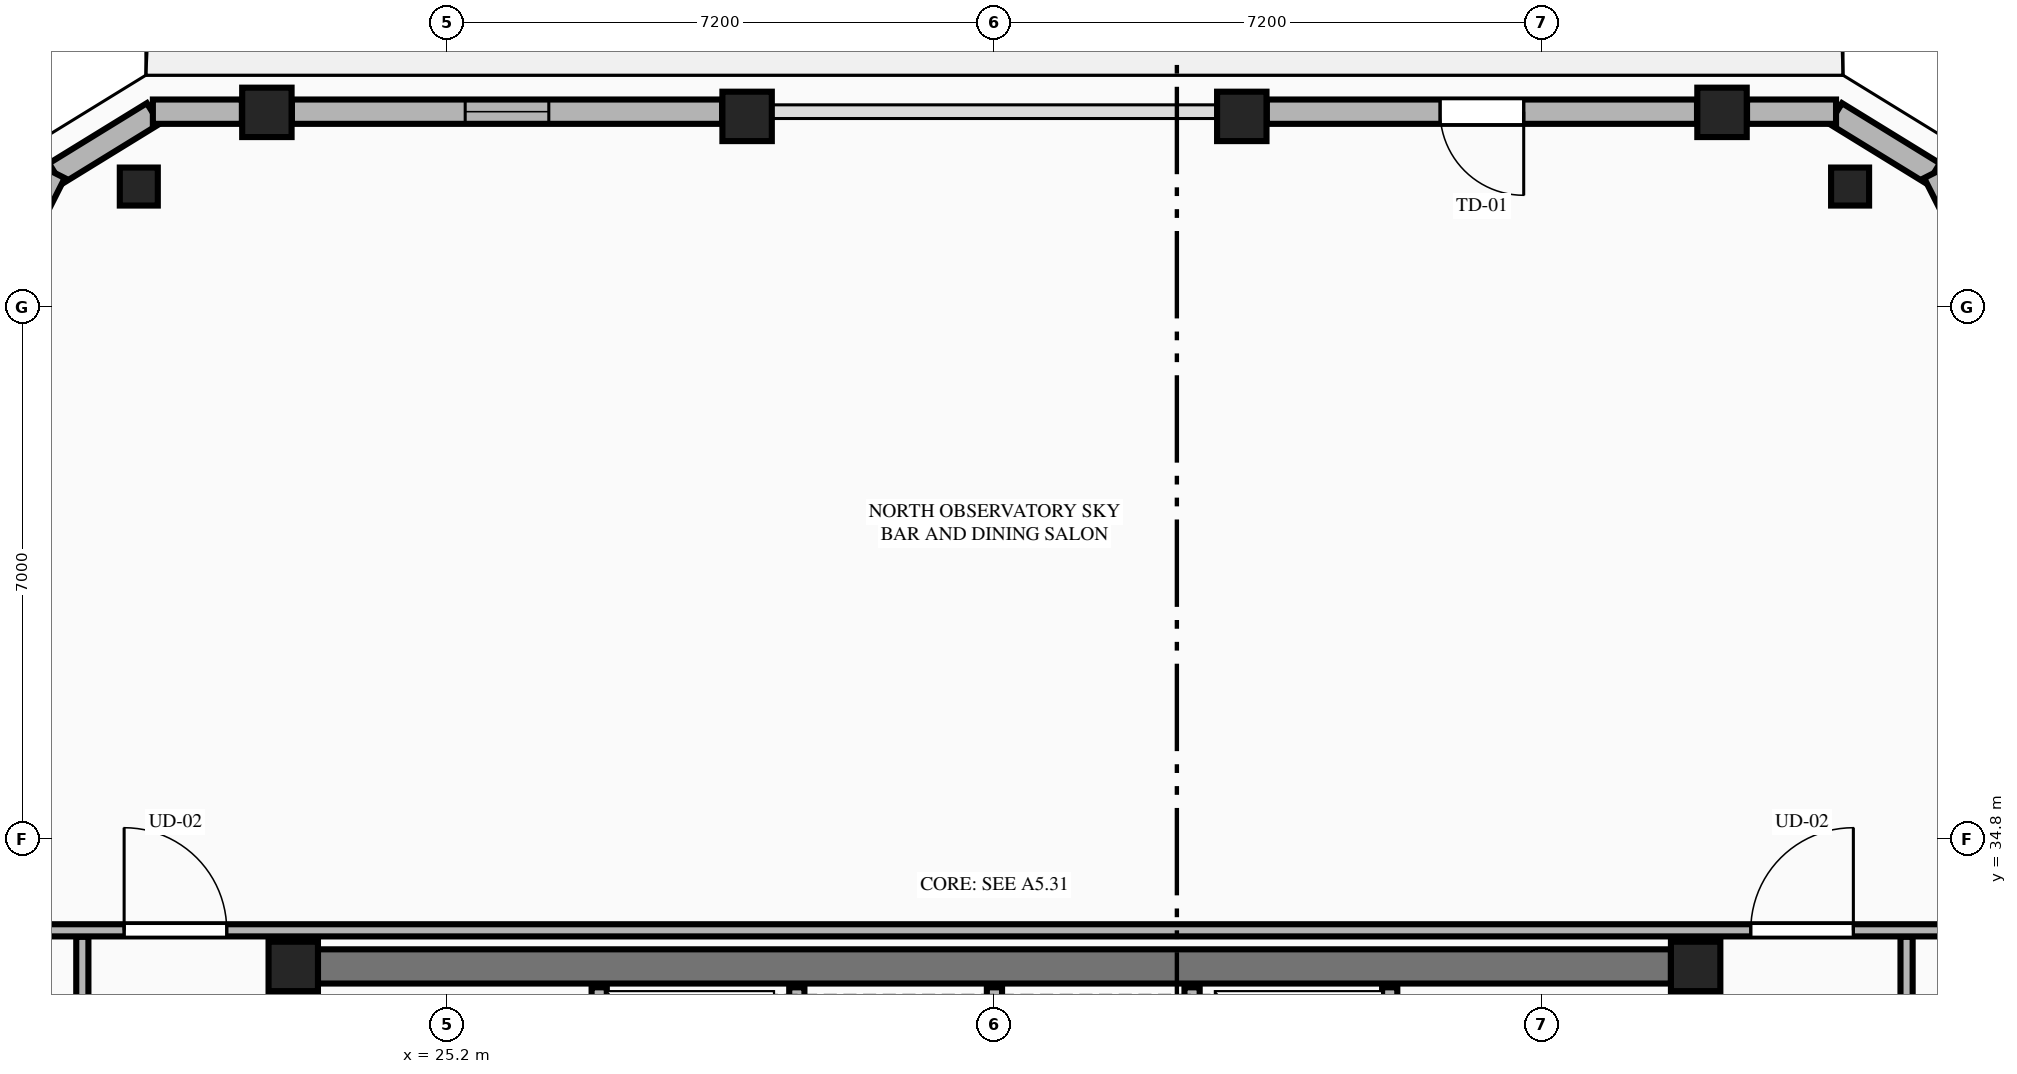
"""IFC4 building model, lengths in metres.
Left out: names, types, materials, properties, quantities, classifications, styles, units other than length and angle.
Written with IfcOpenShell. Run it as: python <this file> out.ifc"""

import sys

from ifc_helpers import new_model, si_unit, direction, frame, frame_2d, origin, origin_2d, place, context, subcontext, project, spatial, rectangle, extrude, element, fill, save


model = new_model("IFC4")
c1 = context("Model", 3, precision=1e-05, world=origin(), true_north=direction((0.0, 1.0)))
c2 = subcontext(c1, "Body", "Model", "MODEL_VIEW")
j1 = project(units=[si_unit("LENGTHUNIT", "METRE"), si_unit("PLANEANGLEUNIT", "RADIAN")], contexts=[c1])
p1 = place(None, origin())
s1 = spatial("IfcSite", under=j1, at=p1, CompositionType="ELEMENT")
p2 = place(p1, origin())
s2 = spatial("IfcBuilding", under=s1, at=p2, CompositionType="ELEMENT")
p3 = place(p2, frame((0.0, 0.0, 278.1)))
s3 = spatial("IfcBuildingStorey", under=s2, at=p3, CompositionType="ELEMENT", Elevation=278.1)
for number, where, z_axis, x_axis in (
    (1, (41.625, 33.125, 0.0), (0.0, 0.0, 1.0), (1.0, 0.0, 0.0)),
    (2, (23.175, 33.125, 0.0), (0.0, 0.0, 1.0), (1.0, 0.0, 0.0)),
):
    element("IfcColumn", number, at=place(p3, frame(where, z_axis=z_axis, x_axis=x_axis)), inside=s3, PredefinedType="COLUMN", context=c2, shape_type="SweptSolid", body=[
        extrude(rectangle(XDim=0.65, YDim=0.65, at=origin_2d()), origin(), (0.0, 0.0, 1.0), 5.4),
    ])
p4 = place(p3, frame((23.5, 33.125, 0.0), z_axis=(0.0, 0.0, 1.0), x_axis=(1.0, 0.0, 0.0)))
e3 = element("IfcWall", 3, at=p4, inside=s3, PredefinedType="SHEAR", context=c2, shape_type="SweptSolid", body=[
    extrude(rectangle(XDim=17.8, YDim=0.45, at=frame_2d((8.9, 0.0))), origin(), (0.0, 0.0, 1.0), 5.2),
])
p5 = place(p3, frame((23.175, 19.0, 0.0), z_axis=(0.0, 0.0, 1.0), x_axis=(0.0, 1.0, 0.0)))
e4 = element("IfcWall", 4, at=p5, inside=s3, PredefinedType="SHEAR", context=c2, shape_type="SweptSolid", body=[
    extrude(rectangle(XDim=13.8, YDim=0.45, at=frame_2d((6.9, 0.0))), origin(), (0.0, 0.0, 1.0), 5.2),
])
p6 = place(p5, frame((2.84, 0.0, 0.0)))
e5 = element("IfcOpeningElement", 5, at=p6, cuts=e4, PredefinedType="OPENING", context=c2, shape_type="SweptSolid", body=[
    extrude(rectangle(XDim=1.22, YDim=2.25, at=frame_2d((0.61, 1.125))), frame((0.0, 0.235, 0.0), z_axis=(0.0, -1.0, 0.0), x_axis=(1.0, 0.0, 0.0)), (0.0, 0.0, 1.0), 0.47),
])
p7 = place(p3, frame((41.625, 19.0, 0.0), z_axis=(0.0, 0.0, 1.0), x_axis=(0.0, 1.0, 0.0)))
e6 = element("IfcWall", 6, at=p7, inside=s3, PredefinedType="SHEAR", context=c2, shape_type="SweptSolid", body=[
    extrude(rectangle(XDim=13.8, YDim=0.45, at=frame_2d((6.9, 0.0))), origin(), (0.0, 0.0, 1.0), 5.2),
])
p8 = place(p7, frame((2.84, 0.0, 0.0)))
e7 = element("IfcOpeningElement", 7, at=p8, cuts=e6, PredefinedType="OPENING", context=c2, shape_type="SweptSolid", body=[
    extrude(rectangle(XDim=1.22, YDim=2.25, at=frame_2d((0.61, 1.125))), frame((0.0, 0.235, 0.0), z_axis=(0.0, -1.0, 0.0), x_axis=(1.0, 0.0, 0.0)), (0.0, 0.0, 1.0), 0.47),
])
for number, where, z_axis, x_axis in (
    (8, (41.972, 44.361, 0.0), (0.0, 0.0, 1.0), (1.0, 0.0, 0.0)),
    (9, (35.654, 44.308, 0.0), (0.0, 0.0, 1.0), (1.0, 0.0, 0.0)),
    (10, (29.146, 44.308, 0.0), (0.0, 0.0, 1.0), (1.0, 0.0, 0.0)),
    (11, (22.828, 44.361, 0.0), (0.0, 0.0, 1.0), (1.0, 0.0, 0.0)),
):
    element("IfcColumn", number, at=place(p3, frame(where, z_axis=z_axis, x_axis=x_axis)), inside=s3, PredefinedType="COLUMN", context=c2, shape_type="SweptSolid", body=[
        extrude(rectangle(XDim=0.65, YDim=0.65, at=origin_2d()), origin(), (0.0, 0.0, 1.0), 5.4),
    ])
for number, where, z_axis, x_axis in (
    (12, (43.657, 43.385, 0.0), (0.0, 0.0, 1.0), (-0.865, 0.501, 0.0)),
    (13, (21.143, 43.385, 0.0), (0.0, 0.0, 1.0), (-0.865, -0.501, 0.0)),
):
    element("IfcColumn", number, at=place(p3, frame(where, z_axis=z_axis, x_axis=x_axis)), inside=s3, PredefinedType="PILASTER", context=c2, shape_type="SweptSolid", body=[
        extrude(rectangle(XDim=0.5, YDim=0.35, at=origin_2d()), origin(), (0.0, 0.0, 1.0), 5.4),
    ])
for number, where, z_axis, x_axis in (
    (14, (27.2, 30.0, 0.0), (0.0, 0.0, 1.0), (0.0, 1.0, 0.0)),
    (15, (29.8, 30.0, 0.0), (0.0, 0.0, 1.0), (0.0, 1.0, 0.0)),
    (16, (32.4, 30.0, 0.0), (0.0, 0.0, 1.0), (0.0, 1.0, 0.0)),
    (17, (35.0, 30.0, 0.0), (0.0, 0.0, 1.0), (0.0, 1.0, 0.0)),
    (18, (37.6, 30.0, 0.0), (0.0, 0.0, 1.0), (0.0, 1.0, 0.0)),
):
    element("IfcWall", number, at=place(p3, frame(where, z_axis=z_axis, x_axis=x_axis)), inside=s3, PredefinedType="PLUMBINGWALL", context=c2, shape_type="SweptSolid", body=[
        extrude(rectangle(XDim=2.85, YDim=0.2, at=frame_2d((1.425, 0.0))), origin(), (0.0, 0.0, 1.0), 5.2),
    ])
p9 = place(p3, frame((20.4, 18.285, 0.0), z_axis=(0.0, 0.0, 1.0), x_axis=(0.0, 1.0, 0.0)))
e19 = element("IfcWall", 19, at=p9, inside=s3, PredefinedType="PARTITIONING", context=c2, shape_type="SweptSolid", body=[
    extrude(rectangle(XDim=15.23, YDim=0.16, at=frame_2d((7.615, 0.0))), origin(), (0.0, 0.0, 1.0), 4.887),
])
p10 = place(p9, frame((5.5, 0.0, 0.0)))
e20 = element("IfcOpeningElement", 20, at=p10, cuts=e19, PredefinedType="OPENING", context=c2, shape_type="SweptSolid", body=[
    extrude(rectangle(XDim=1.35, YDim=2.35, at=frame_2d((0.675, 1.175))), frame((0.0, 0.09, 0.0), z_axis=(0.0, -1.0, 0.0), x_axis=(1.0, 0.0, 0.0)), (0.0, 0.0, 1.0), 0.18),
])
p11 = place(p3, frame((44.4, 18.285, 0.0), z_axis=(0.0, 0.0, 1.0), x_axis=(0.0, 1.0, 0.0)))
e21 = element("IfcWall", 21, at=p11, inside=s3, PredefinedType="PARTITIONING", context=c2, shape_type="SweptSolid", body=[
    extrude(rectangle(XDim=15.23, YDim=0.16, at=frame_2d((7.615, 0.0))), origin(), (0.0, 0.0, 1.0), 4.887),
])
p12 = place(p11, frame((3.2, 0.0, 0.0)))
e22 = element("IfcOpeningElement", 22, at=p12, cuts=e21, PredefinedType="OPENING", context=c2, shape_type="SweptSolid", body=[
    extrude(rectangle(XDim=1.02, YDim=2.25, at=frame_2d((0.51, 1.125))), frame((0.0, 0.09, 0.0), z_axis=(0.0, -1.0, 0.0), x_axis=(1.0, 0.0, 0.0)), (0.0, 0.0, 1.0), 0.18),
])
p13 = place(p11, frame((10.1, 0.0, 0.0)))
e23 = element("IfcOpeningElement", 23, at=p13, cuts=e21, PredefinedType="OPENING", context=c2, shape_type="SweptSolid", body=[
    extrude(rectangle(XDim=0.86, YDim=2.1, at=frame_2d((0.43, 1.05))), frame((0.0, 0.09, 0.0), z_axis=(0.0, -1.0, 0.0), x_axis=(1.0, 0.0, 0.0)), (0.0, 0.0, 1.0), 0.18),
])
p14 = place(p11, frame((13.0, 0.0, 0.0)))
e24 = element("IfcOpeningElement", 24, at=p14, cuts=e21, PredefinedType="OPENING", context=c2, shape_type="SweptSolid", body=[
    extrude(rectangle(XDim=0.96, YDim=2.15, at=frame_2d((0.48, 1.075))), frame((0.0, 0.09, 0.0), z_axis=(0.0, -1.0, 0.0), x_axis=(1.0, 0.0, 0.0)), (0.0, 0.0, 1.0), 0.18),
])
p15 = place(p3, frame((15.079, 33.6, 0.0), z_axis=(0.0, 0.0, 1.0), x_axis=(1.0, 0.0, 0.0)))
e25 = element("IfcWall", 25, at=p15, inside=s3, PredefinedType="PARTITIONING", context=c2, shape_type="SweptSolid", body=[
    extrude(rectangle(XDim=34.642, YDim=0.16, at=frame_2d((17.321, 0.0))), origin(), (0.0, 0.0, 1.0), 5.2),
])
p16 = place(p15, frame((5.871, 0.0, 0.0)))
e26 = element("IfcOpeningElement", 26, at=p16, cuts=e25, PredefinedType="OPENING", context=c2, shape_type="SweptSolid", body=[
    extrude(rectangle(XDim=1.35, YDim=2.35, at=frame_2d((0.675, 1.175))), frame((0.0, 0.09, 0.0), z_axis=(0.0, -1.0, 0.0), x_axis=(1.0, 0.0, 0.0)), (0.0, 0.0, 1.0), 0.18),
])
p17 = place(p15, frame((27.271, 0.0, 0.0)))
e27 = element("IfcOpeningElement", 27, at=p17, cuts=e25, PredefinedType="OPENING", context=c2, shape_type="SweptSolid", body=[
    extrude(rectangle(XDim=1.35, YDim=2.35, at=frame_2d((0.675, 1.175))), frame((0.0, 0.09, 0.0), z_axis=(0.0, -1.0, 0.0), x_axis=(1.0, 0.0, 0.0)), (0.0, 0.0, 1.0), 0.18),
])
p18 = place(p3, frame((44.755, 43.554, 0.0), z_axis=(0.0, 0.0, 1.0), x_axis=(-0.851813523106, 0.523845131555, 0.0)))
e28 = element("IfcWall", 28, at=p18, inside=s3, PredefinedType="STANDARD", context=c2, shape_type="SweptSolid", body=[
    extrude(rectangle(XDim=1.512, YDim=0.32, at=frame_2d((0.756, 0.0))), origin(), (0.0, 0.0, 1.0), 5.2),
])
p19 = place(p3, frame((21.333, 44.346, 0.0), z_axis=(0.0, 0.0, 1.0), x_axis=(-0.851857826631, -0.523773083698, 0.0)))
e29 = element("IfcWall", 29, at=p19, inside=s3, PredefinedType="STANDARD", context=c2, shape_type="SweptSolid", body=[
    extrude(rectangle(XDim=1.512, YDim=0.32, at=frame_2d((0.756, 0.0))), origin(), (0.0, 0.0, 1.0), 5.2),
])
p20 = place(p3, frame((45.158, 42.81, 0.0), z_axis=(0.0, 0.0, 1.0), x_axis=(-0.451456201372, 0.892293280398, 0.0)))
e30 = element("IfcWall", 30, at=p20, inside=s3, PredefinedType="STANDARD", context=c2, shape_type="SweptSolid", body=[
    extrude(rectangle(XDim=0.851, YDim=0.32, at=frame_2d((0.425, 0.0))), origin(), (0.0, 0.0, 1.0), 5.2),
])
p21 = place(p3, frame((43.472, 44.37, 0.0), z_axis=(0.0, 0.0, 1.0), x_axis=(-1.0, 0.0, 0.0)))
e31 = element("IfcWall", 31, at=p21, inside=s3, PredefinedType="STANDARD", context=c2, shape_type="SweptSolid", body=[
    extrude(rectangle(XDim=1.171, YDim=0.32, at=frame_2d((0.585, 0.0))), origin(), (0.0, 0.0, 1.0), 5.2),
])
p22 = place(p3, frame((41.643, 44.37, 0.0), z_axis=(0.0, 0.0, 1.0), x_axis=(-1.0, 0.0, 0.0)))
e32 = element("IfcWall", 32, at=p22, inside=s3, PredefinedType="STANDARD", context=c2, shape_type="SweptSolid", body=[
    extrude(rectangle(XDim=5.66, YDim=0.32, at=frame_2d((2.83, 0.0))), origin(), (0.0, 0.0, 1.0), 4.39),
])
p23 = place(p22, frame((2.28, 0.0, 0.0)))
e33 = element("IfcOpeningElement", 33, at=p23, cuts=e32, PredefinedType="OPENING", context=c2, shape_type="SweptSolid", body=[
    extrude(rectangle(XDim=1.1, YDim=2.25, at=frame_2d((0.55, 1.125))), frame((0.0, 0.17, 0.0), z_axis=(0.0, -1.0, 0.0), x_axis=(1.0, 0.0, 0.0)), (0.0, 0.0, 1.0), 0.34),
])
p24 = place(p3, frame((28.817, 44.37, 0.0), z_axis=(0.0, 0.0, 1.0), x_axis=(-1.0, 0.0, 0.0)))
e34 = element("IfcWall", 34, at=p24, inside=s3, PredefinedType="STANDARD", context=c2, shape_type="SweptSolid", body=[
    extrude(rectangle(XDim=5.66, YDim=0.32, at=frame_2d((2.83, 0.0))), origin(), (0.0, 0.0, 1.0), 4.39),
])
p25 = place(p24, frame((2.28, 0.0, 0.75)))
e35 = element("IfcOpeningElement", 35, at=p25, cuts=e34, PredefinedType="OPENING", context=c2, shape_type="SweptSolid", body=[
    extrude(rectangle(XDim=1.1, YDim=2.0, at=frame_2d((0.55, 1.0))), frame((0.0, 0.17, 0.0), z_axis=(0.0, -1.0, 0.0), x_axis=(1.0, 0.0, 0.0)), (0.0, 0.0, 1.0), 0.34),
])
p26 = place(p3, frame((22.499, 44.37, 0.0), z_axis=(0.0, 0.0, 1.0), x_axis=(-1.0, 0.0, 0.0)))
e36 = element("IfcWall", 36, at=p26, inside=s3, PredefinedType="STANDARD", context=c2, shape_type="SweptSolid", body=[
    extrude(rectangle(XDim=1.171, YDim=0.32, at=frame_2d((0.585, 0.0))), origin(), (0.0, 0.0, 1.0), 5.2),
])
p27 = place(p3, frame((20.026, 43.569, 0.0), z_axis=(0.0, 0.0, 1.0), x_axis=(-0.451227648573, -0.892408880034, 0.0)))
e37 = element("IfcWall", 37, at=p27, inside=s3, PredefinedType="STANDARD", context=c2, shape_type="SweptSolid", body=[
    extrude(rectangle(XDim=0.851, YDim=0.32, at=frame_2d((0.425, 0.0))), origin(), (0.0, 0.0, 1.0), 5.2),
])
p28 = place(p16, origin())
e38 = element("IfcDoor", 38, at=p28, inside=s3, OperationType="SINGLE_SWING_LEFT", PredefinedType="DOOR", context=c2, shape_type="SweptSolid", body=[
    extrude(rectangle(XDim=1.35, YDim=2.35, at=frame_2d((0.675, 1.175))), frame((0.0, 0.025, 0.0), z_axis=(0.0, -1.0, 0.0), x_axis=(1.0, 0.0, 0.0)), (0.0, 0.0, 1.0), 0.05),
])
fill(e26, e38)
p29 = place(p17, origin())
e39 = element("IfcDoor", 39, at=p29, inside=s3, OperationType="SINGLE_SWING_RIGHT", PredefinedType="DOOR", context=c2, shape_type="SweptSolid", body=[
    extrude(rectangle(XDim=1.35, YDim=2.35, at=frame_2d((0.675, 1.175))), frame((0.0, 0.025, 0.0), z_axis=(0.0, -1.0, 0.0), x_axis=(1.0, 0.0, 0.0)), (0.0, 0.0, 1.0), 0.05),
])
fill(e27, e39)
p30 = place(p23, origin())
e40 = element("IfcDoor", 40, at=p30, inside=s3, OperationType="SINGLE_SWING_LEFT", PredefinedType="DOOR", context=c2, shape_type="SweptSolid", body=[
    extrude(rectangle(XDim=1.1, YDim=2.25, at=frame_2d((0.55, 1.125))), frame((0.0, 0.025, 0.0), z_axis=(0.0, -1.0, 0.0), x_axis=(1.0, 0.0, 0.0)), (0.0, 0.0, 1.0), 0.05),
])
fill(e33, e40)
p31 = place(p25, origin())
e41 = element("IfcWindow", 41, at=p31, inside=s3, PartitioningType="SINGLE_PANEL", PredefinedType="WINDOW", context=c2, shape_type="SweptSolid", body=[
    extrude(rectangle(XDim=1.1, YDim=2.0, at=frame_2d((0.55, 1.0))), frame((0.0, 0.03, 0.0), z_axis=(0.0, -1.0, 0.0), x_axis=(1.0, 0.0, 0.0)), (0.0, 0.0, 1.0), 0.06),
])
fill(e35, e41)
save(model, sys.argv[1])
